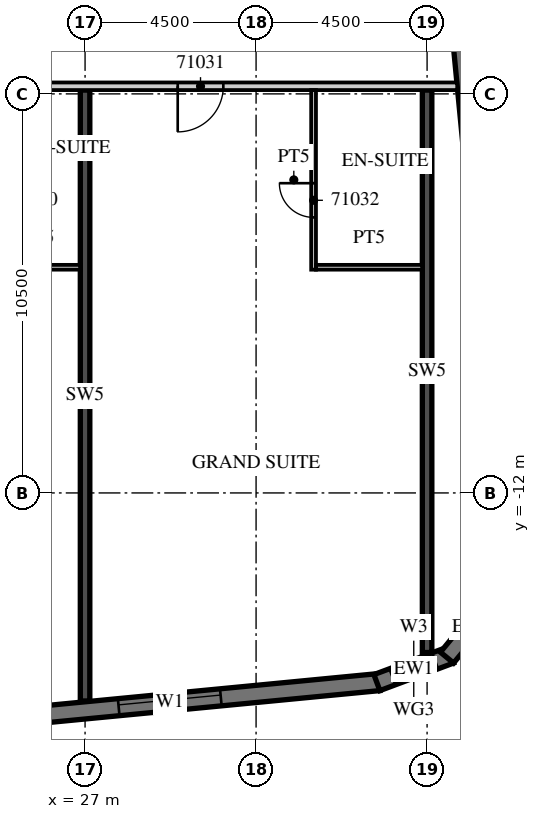
"""IFC4 building model, lengths in metres.
Left out: names, types, materials, properties, quantities, classifications, styles, units other than length and angle.
Written with IfcOpenShell. Run it as: python <this file> out.ifc"""

import sys

from ifc_helpers import new_model, si_unit, direction, frame, frame_2d, origin, place, context, subcontext, project, spatial, polyline, rectangle, outline, extrude, element, fill, save


model = new_model("IFC4")
c1 = context("Model", 3, precision=1e-05, world=origin(), true_north=direction((0.0, 1.0)))
c2 = subcontext(c1, "Body", "Model", "MODEL_VIEW")
j1 = project(units=[si_unit("LENGTHUNIT", "METRE"), si_unit("PLANEANGLEUNIT", "RADIAN")], contexts=[c1])
p1 = place(None, origin())
s1 = spatial("IfcSite", under=j1, at=p1, CompositionType="ELEMENT")
p2 = place(p1, origin())
s2 = spatial("IfcBuilding", under=s1, at=p2, CompositionType="ELEMENT")
p3 = place(p2, frame((0.0, 0.0, 285.0)))
s3 = spatial("IfcBuildingStorey", under=s2, at=p3, CompositionType="ELEMENT", Elevation=285.0)
p4 = place(p3, frame((27.0, -17.474, 0.0), z_axis=(0.0, 0.0, 1.0), x_axis=(0.0, 1.0, 0.0)))
e1 = element("IfcWall", 1, at=p4, inside=s3, PredefinedType="SHEAR", context=c2, shape_type="SweptSolid", body=[
    extrude(rectangle(XDim=16.074, YDim=0.25, at=frame_2d((8.037, 0.0))), origin(), (0.0, 0.0, 1.0), 3.3),
])
p5 = place(p3, frame((36.0, -16.199, 0.0), z_axis=(0.0, 0.0, 1.0), x_axis=(0.0, 1.0, 0.0)))
e2 = element("IfcWall", 2, at=p5, inside=s3, PredefinedType="SHEAR", context=c2, shape_type="SweptSolid", body=[
    extrude(rectangle(XDim=14.799, YDim=0.25, at=frame_2d((7.399, 0.0))), origin(), (0.0, 0.0, 1.0), 3.3),
])
p6 = place(p3, frame((-13.521, -21.624, 0.0), z_axis=(0.0, 0.0, 1.0), x_axis=(0.995396186218, 0.095845878695, 0.0)))
e3 = element("IfcWall", 3, at=p6, inside=s3, PredefinedType="SOLIDWALL", context=c2, shape_type="SweptSolid", body=[
    extrude(rectangle(XDim=48.481, YDim=0.45, at=frame_2d((24.241, 0.0))), origin(), (0.0, 0.0, 1.0), 3.02),
])
p7 = place(p6, frame((0.91, 0.0, 0.45)))
e4 = element("IfcOpeningElement", 4, at=p7, cuts=e3, PredefinedType="OPENING", context=c2, shape_type="SweptSolid", body=[
    extrude(rectangle(XDim=2.7, YDim=2.25, at=frame_2d((1.35, 1.125))), frame((0.0, 0.235, 0.0), z_axis=(0.0, -1.0, 0.0), x_axis=(1.0, 0.0, 0.0)), (0.0, 0.0, 1.0), 0.47),
])
p8 = place(p6, frame((5.431, 0.0, 0.45)))
e5 = element("IfcOpeningElement", 5, at=p8, cuts=e3, PredefinedType="OPENING", context=c2, shape_type="SweptSolid", body=[
    extrude(rectangle(XDim=2.7, YDim=2.25, at=frame_2d((1.35, 1.125))), frame((0.0, 0.235, 0.0), z_axis=(0.0, -1.0, 0.0), x_axis=(1.0, 0.0, 0.0)), (0.0, 0.0, 1.0), 0.47),
])
p9 = place(p6, frame((9.952, 0.0, 0.45)))
e6 = element("IfcOpeningElement", 6, at=p9, cuts=e3, PredefinedType="OPENING", context=c2, shape_type="SweptSolid", body=[
    extrude(rectangle(XDim=2.7, YDim=2.25, at=frame_2d((1.35, 1.125))), frame((0.0, 0.235, 0.0), z_axis=(0.0, -1.0, 0.0), x_axis=(1.0, 0.0, 0.0)), (0.0, 0.0, 1.0), 0.47),
])
p10 = place(p6, frame((14.473, 0.0, 0.45)))
e7 = element("IfcOpeningElement", 7, at=p10, cuts=e3, PredefinedType="OPENING", context=c2, shape_type="SweptSolid", body=[
    extrude(rectangle(XDim=2.7, YDim=2.25, at=frame_2d((1.35, 1.125))), frame((0.0, 0.235, 0.0), z_axis=(0.0, -1.0, 0.0), x_axis=(1.0, 0.0, 0.0)), (0.0, 0.0, 1.0), 0.47),
])
p11 = place(p6, frame((18.994, 0.0, 0.45)))
e8 = element("IfcOpeningElement", 8, at=p11, cuts=e3, PredefinedType="OPENING", context=c2, shape_type="SweptSolid", body=[
    extrude(rectangle(XDim=2.7, YDim=2.25, at=frame_2d((1.35, 1.125))), frame((0.0, 0.235, 0.0), z_axis=(0.0, -1.0, 0.0), x_axis=(1.0, 0.0, 0.0)), (0.0, 0.0, 1.0), 0.47),
])
p12 = place(p6, frame((23.514, 0.0, 0.45)))
e9 = element("IfcOpeningElement", 9, at=p12, cuts=e3, PredefinedType="OPENING", context=c2, shape_type="SweptSolid", body=[
    extrude(rectangle(XDim=2.7, YDim=2.25, at=frame_2d((1.35, 1.125))), frame((0.0, 0.235, 0.0), z_axis=(0.0, -1.0, 0.0), x_axis=(1.0, 0.0, 0.0)), (0.0, 0.0, 1.0), 0.47),
])
p13 = place(p6, frame((28.035, 0.0, 0.45)))
e10 = element("IfcOpeningElement", 10, at=p13, cuts=e3, PredefinedType="OPENING", context=c2, shape_type="SweptSolid", body=[
    extrude(rectangle(XDim=2.7, YDim=2.25, at=frame_2d((1.35, 1.125))), frame((0.0, 0.235, 0.0), z_axis=(0.0, -1.0, 0.0), x_axis=(1.0, 0.0, 0.0)), (0.0, 0.0, 1.0), 0.47),
])
p14 = place(p6, frame((32.556, 0.0, 0.45)))
e11 = element("IfcOpeningElement", 11, at=p14, cuts=e3, PredefinedType="OPENING", context=c2, shape_type="SweptSolid", body=[
    extrude(rectangle(XDim=2.7, YDim=2.25, at=frame_2d((1.35, 1.125))), frame((0.0, 0.235, 0.0), z_axis=(0.0, -1.0, 0.0), x_axis=(1.0, 0.0, 0.0)), (0.0, 0.0, 1.0), 0.47),
])
p15 = place(p6, frame((37.077, 0.0, 0.45)))
e12 = element("IfcOpeningElement", 12, at=p15, cuts=e3, PredefinedType="OPENING", context=c2, shape_type="SweptSolid", body=[
    extrude(rectangle(XDim=2.7, YDim=2.25, at=frame_2d((1.35, 1.125))), frame((0.0, 0.235, 0.0), z_axis=(0.0, -1.0, 0.0), x_axis=(1.0, 0.0, 0.0)), (0.0, 0.0, 1.0), 0.47),
])
p16 = place(p6, frame((41.598, 0.0, 0.45)))
e13 = element("IfcOpeningElement", 13, at=p16, cuts=e3, PredefinedType="OPENING", context=c2, shape_type="SweptSolid", body=[
    extrude(rectangle(XDim=2.7, YDim=2.25, at=frame_2d((1.35, 1.125))), frame((0.0, 0.235, 0.0), z_axis=(0.0, -1.0, 0.0), x_axis=(1.0, 0.0, 0.0)), (0.0, 0.0, 1.0), 0.47),
])
p17 = place(p3, frame((34.679, -16.99, 0.0), z_axis=(0.0, 0.0, 1.0), x_axis=(0.936677599948, 0.350192909346, 0.0)))
e14 = element("IfcWall", 14, at=p17, inside=s3, PredefinedType="SOLIDWALL", context=c2, shape_type="SweptSolid", body=[
    extrude(outline(polyline([(0.0, -0.225), (2.071, -0.225), (1.95, 0.225), (0.121, 0.225), (0.0, -0.225)])), origin(), (0.0, 0.0, 1.0), 3.02),
])
p18 = place(p17, frame((0.435, 0.0, 0.45)))
e15 = element("IfcOpeningElement", 15, at=p18, cuts=e14, PredefinedType="OPENING", context=c2, shape_type="SweptSolid", body=[
    extrude(rectangle(XDim=1.2, YDim=2.25, at=frame_2d((0.6, 1.125))), frame((0.0, 0.235, 0.0), z_axis=(0.0, -1.0, 0.0), x_axis=(1.0, 0.0, 0.0)), (0.0, 0.0, 1.0), 0.47),
])
p19 = place(p3, frame((36.524, -16.333, 0.0), z_axis=(0.0, 0.0, 1.0), x_axis=(0.636046112757, 0.771651049663, 0.0)))
e16 = element("IfcWall", 16, at=p19, inside=s3, PredefinedType="SOLIDWALL", context=c2, shape_type="SweptSolid", body=[
    extrude(outline(polyline([(0.0, -0.225), (2.071, -0.225), (1.95, 0.225), (0.121, 0.225), (0.0, -0.225)])), origin(), (0.0, 0.0, 1.0), 3.02),
])
p20 = place(p3, frame((38.132, -12.858, 0.0), z_axis=(0.0, 0.0, 1.0), x_axis=(-0.095847749461, 0.995396006082, 0.0)))
e17 = element("IfcWall", 17, at=p20, inside=s3, PredefinedType="SOLIDWALL", context=c2, shape_type="SweptSolid", body=[
    extrude(rectangle(XDim=32.0, YDim=0.45, at=frame_2d((16.0, 0.0))), origin(), (0.0, 0.0, 1.0), 3.02),
])
p21 = place(p3, frame((-13.5, -1.3, 0.0), z_axis=(0.0, 0.0, 1.0), x_axis=(1.0, 0.0, 0.0)))
e18 = element("IfcWall", 18, at=p21, inside=s3, PredefinedType="PARTITIONING", context=c2, shape_type="SweptSolid", body=[
    extrude(rectangle(XDim=50.293, YDim=0.2, at=frame_2d((25.146, 0.0))), origin(), (0.0, 0.0, 1.0), 3.02),
])
p22 = place(p21, frame((2.925, 0.0, 0.0)))
e19 = element("IfcOpeningElement", 19, at=p22, cuts=e18, PredefinedType="OPENING", context=c2, shape_type="SweptSolid", body=[
    extrude(rectangle(XDim=1.0, YDim=2.1, at=frame_2d((0.5, 1.05))), frame((0.0, 0.11, 0.0), z_axis=(0.0, -1.0, 0.0), x_axis=(1.0, 0.0, 0.0)), (0.0, 0.0, 1.0), 0.22),
])
p23 = place(p21, frame((6.938, 0.0, 0.0)))
e20 = element("IfcOpeningElement", 20, at=p23, cuts=e18, PredefinedType="OPENING", context=c2, shape_type="SweptSolid", body=[
    extrude(rectangle(XDim=1.2, YDim=2.1, at=frame_2d((0.6, 1.05))), frame((0.0, 0.11, 0.0), z_axis=(0.0, -1.0, 0.0), x_axis=(1.0, 0.0, 0.0)), (0.0, 0.0, 1.0), 0.22),
])
p24 = place(p21, frame((14.075, 0.0, 0.0)))
e21 = element("IfcOpeningElement", 21, at=p24, cuts=e18, PredefinedType="OPENING", context=c2, shape_type="SweptSolid", body=[
    extrude(rectangle(XDim=1.0, YDim=2.1, at=frame_2d((0.5, 1.05))), frame((0.0, 0.11, 0.0), z_axis=(0.0, -1.0, 0.0), x_axis=(1.0, 0.0, 0.0)), (0.0, 0.0, 1.0), 0.22),
])
p25 = place(p21, frame((18.55, 0.0, 0.0)))
e22 = element("IfcOpeningElement", 22, at=p25, cuts=e18, PredefinedType="OPENING", context=c2, shape_type="SweptSolid", body=[
    extrude(rectangle(XDim=1.0, YDim=2.1, at=frame_2d((0.5, 1.05))), frame((0.0, 0.11, 0.0), z_axis=(0.0, -1.0, 0.0), x_axis=(1.0, 0.0, 0.0)), (0.0, 0.0, 1.0), 0.22),
])
p26 = place(p21, frame((23.075, 0.0, 0.0)))
e23 = element("IfcOpeningElement", 23, at=p26, cuts=e18, PredefinedType="OPENING", context=c2, shape_type="SweptSolid", body=[
    extrude(rectangle(XDim=1.0, YDim=2.1, at=frame_2d((0.5, 1.05))), frame((0.0, 0.11, 0.0), z_axis=(0.0, -1.0, 0.0), x_axis=(1.0, 0.0, 0.0)), (0.0, 0.0, 1.0), 0.22),
])
p27 = place(p21, frame((29.925, 0.0, 0.0)))
e24 = element("IfcOpeningElement", 24, at=p27, cuts=e18, PredefinedType="OPENING", context=c2, shape_type="SweptSolid", body=[
    extrude(rectangle(XDim=1.0, YDim=2.1, at=frame_2d((0.5, 1.05))), frame((0.0, 0.11, 0.0), z_axis=(0.0, -1.0, 0.0), x_axis=(1.0, 0.0, 0.0)), (0.0, 0.0, 1.0), 0.22),
])
p28 = place(p21, frame((32.075, 0.0, 0.0)))
e25 = element("IfcOpeningElement", 25, at=p28, cuts=e18, PredefinedType="OPENING", context=c2, shape_type="SweptSolid", body=[
    extrude(rectangle(XDim=1.0, YDim=2.1, at=frame_2d((0.5, 1.05))), frame((0.0, 0.11, 0.0), z_axis=(0.0, -1.0, 0.0), x_axis=(1.0, 0.0, 0.0)), (0.0, 0.0, 1.0), 0.22),
])
p29 = place(p21, frame((36.55, 0.0, 0.0)))
e26 = element("IfcOpeningElement", 26, at=p29, cuts=e18, PredefinedType="OPENING", context=c2, shape_type="SweptSolid", body=[
    extrude(rectangle(XDim=1.0, YDim=2.1, at=frame_2d((0.5, 1.05))), frame((0.0, 0.11, 0.0), z_axis=(0.0, -1.0, 0.0), x_axis=(1.0, 0.0, 0.0)), (0.0, 0.0, 1.0), 0.22),
])
p30 = place(p21, frame((42.938, 0.0, 0.0)))
e27 = element("IfcOpeningElement", 27, at=p30, cuts=e18, PredefinedType="OPENING", context=c2, shape_type="SweptSolid", body=[
    extrude(rectangle(XDim=1.2, YDim=2.1, at=frame_2d((0.6, 1.05))), frame((0.0, 0.11, 0.0), z_axis=(0.0, -1.0, 0.0), x_axis=(1.0, 0.0, 0.0)), (0.0, 0.0, 1.0), 0.22),
])
p31 = place(p3, frame((24.625, -6.062, 0.0), z_axis=(0.0, 0.0, 1.0), x_axis=(1.0, 0.0, 0.0)))
e28 = element("IfcWall", 28, at=p31, inside=s3, PredefinedType="PARTITIONING", context=c2, shape_type="SweptSolid", body=[
    extrude(rectangle(XDim=2.25, YDim=0.125, at=frame_2d((1.125, 0.0))), origin(), (0.0, 0.0, 1.0), 3.02),
])
p32 = place(p3, frame((33.013, -6.125, 0.0), z_axis=(0.0, 0.0, 1.0), x_axis=(0.0, 1.0, 0.0)))
e29 = element("IfcWall", 29, at=p32, inside=s3, PredefinedType="PARTITIONING", context=c2, shape_type="SweptSolid", body=[
    extrude(rectangle(XDim=4.725, YDim=0.125, at=frame_2d((2.363, 0.0))), origin(), (0.0, 0.0, 1.0), 3.02),
])
p33 = place(p32, frame((1.375, 0.0, 0.0)))
e30 = element("IfcOpeningElement", 30, at=p33, cuts=e29, PredefinedType="OPENING", context=c2, shape_type="SweptSolid", body=[
    extrude(rectangle(XDim=0.9, YDim=2.1, at=frame_2d((0.45, 1.05))), frame((0.0, 0.073, 0.0), z_axis=(0.0, -1.0, 0.0), x_axis=(1.0, 0.0, 0.0)), (0.0, 0.0, 1.0), 0.145),
])
p34 = place(p3, frame((33.075, -6.062, 0.0), z_axis=(0.0, 0.0, 1.0), x_axis=(1.0, 0.0, 0.0)))
e31 = element("IfcWall", 31, at=p34, inside=s3, PredefinedType="PARTITIONING", context=c2, shape_type="SweptSolid", body=[
    extrude(rectangle(XDim=2.8, YDim=0.125, at=frame_2d((1.4, 0.0))), origin(), (0.0, 0.0, 1.0), 3.02),
])
p35 = place(p16, origin())
e32 = element("IfcWindow", 32, at=p35, inside=s3, PartitioningType="SINGLE_PANEL", PredefinedType="WINDOW", context=c2, shape_type="SweptSolid", body=[
    extrude(rectangle(XDim=2.7, YDim=2.25, at=frame_2d((1.35, 1.125))), frame((0.0, 0.09, 0.0), z_axis=(0.0, -1.0, 0.0), x_axis=(1.0, 0.0, 0.0)), (0.0, 0.0, 1.0), 0.06),
])
fill(e13, e32)
p36 = place(p18, origin())
e33 = element("IfcWindow", 33, at=p36, inside=s3, PartitioningType="SINGLE_PANEL", PredefinedType="WINDOW", context=c2, shape_type="SweptSolid", body=[
    extrude(rectangle(XDim=1.2, YDim=2.25, at=frame_2d((0.6, 1.125))), frame((0.0, 0.09, 0.0), z_axis=(0.0, -1.0, 0.0), x_axis=(1.0, 0.0, 0.0)), (0.0, 0.0, 1.0), 0.06),
])
fill(e15, e33)
p37 = place(p30, origin())
e34 = element("IfcDoor", 34, at=p37, inside=s3, OperationType="SINGLE_SWING_LEFT", PredefinedType="DOOR", context=c2, shape_type="SweptSolid", body=[
    extrude(rectangle(XDim=1.2, YDim=2.1, at=frame_2d((0.6, 1.05))), frame((0.0, 0.025, 0.0), z_axis=(0.0, -1.0, 0.0), x_axis=(1.0, 0.0, 0.0)), (0.0, 0.0, 1.0), 0.05),
])
fill(e27, e34)
p38 = place(p33, origin())
e35 = element("IfcDoor", 35, at=p38, inside=s3, OperationType="SINGLE_SWING_RIGHT", PredefinedType="DOOR", context=c2, shape_type="SweptSolid", body=[
    extrude(rectangle(XDim=0.9, YDim=2.1, at=frame_2d((0.45, 1.05))), frame((0.0, 0.025, 0.0), z_axis=(0.0, -1.0, 0.0), x_axis=(1.0, 0.0, 0.0)), (0.0, 0.0, 1.0), 0.05),
])
fill(e30, e35)
save(model, sys.argv[1])
